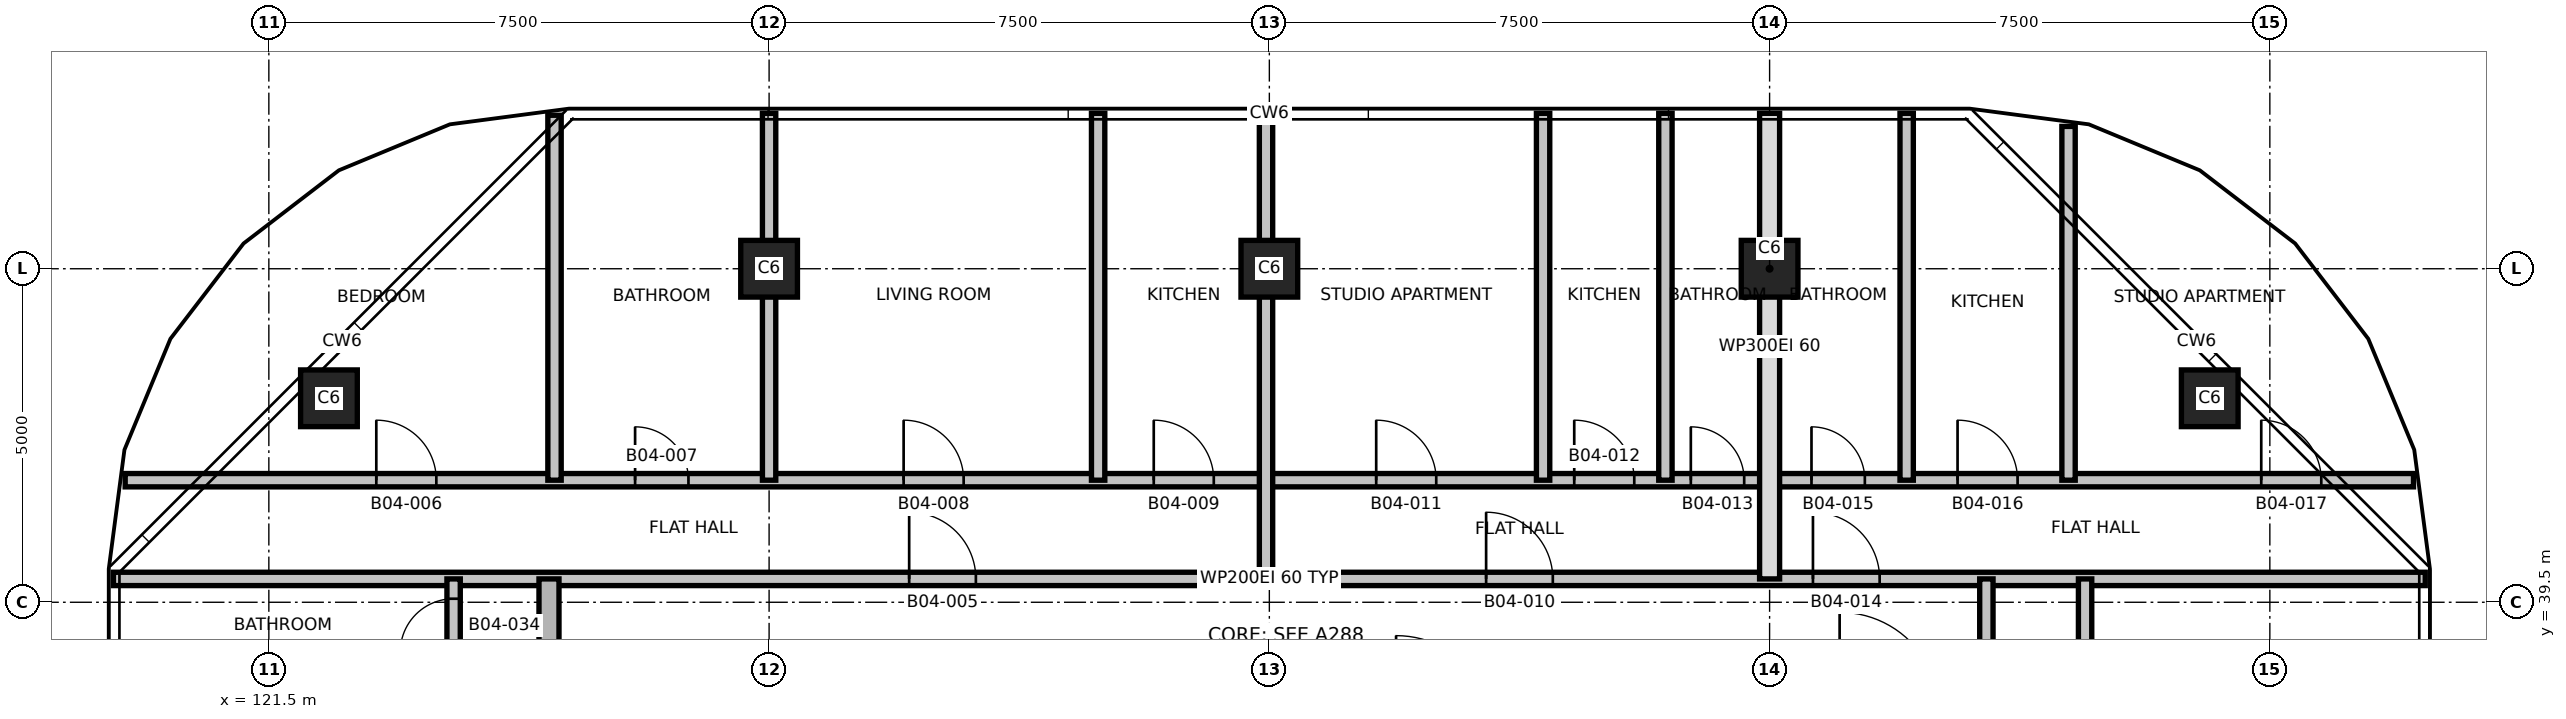
"""IFC4 building model, lengths in metres.
Left out: names, types, materials, properties, quantities, classifications, styles, units other than length and angle.
Written with IfcOpenShell. Run it as: python <this file> out.ifc"""

import sys

from ifc_helpers import new_model, si_unit, direction, frame, frame_2d, origin, origin_2d, place, context, subcontext, project, spatial, rectangle, extrude, element, fill, save


model = new_model("IFC4")
c1 = context("Model", 3, precision=1e-05, world=origin(), true_north=direction((0.0, 1.0)))
c2 = subcontext(c1, "Body", "Model", "MODEL_VIEW")
j1 = project(units=[si_unit("LENGTHUNIT", "METRE"), si_unit("PLANEANGLEUNIT", "RADIAN")], contexts=[c1])
p1 = place(None, origin())
s1 = spatial("IfcSite", under=j1, at=p1, CompositionType="ELEMENT")
p2 = place(p1, origin())
s2 = spatial("IfcBuilding", under=s1, at=p2, CompositionType="ELEMENT")
p3 = place(p2, frame((0.0, 0.0, 63.1)))
s3 = spatial("IfcBuildingStorey", under=s2, at=p3, CompositionType="ELEMENT", Elevation=63.1)
for number, where, z_axis, x_axis in (
    (1, (122.401, 42.558, 0.0), (0.0, 0.0, 1.0), (1.0, 0.0, 0.0)),
    (2, (150.599, 42.558, 0.0), (0.0, 0.0, 1.0), (1.0, 0.0, 0.0)),
    (3, (129.0, 44.5, 0.0), (0.0, 0.0, 1.0), (1.0, 0.0, 0.0)),
    (4, (136.5, 44.5, 0.0), (0.0, 0.0, 1.0), (1.0, 0.0, 0.0)),
    (5, (144.0, 44.5, 0.0), (0.0, 0.0, 1.0), (1.0, 0.0, 0.0)),
):
    element("IfcColumn", number, at=place(p3, frame(where, z_axis=z_axis, x_axis=x_axis)), inside=s3, PredefinedType="COLUMN", context=c2, shape_type="SweptSolid", body=[
        extrude(rectangle(XDim=0.85, YDim=0.85, at=origin_2d()), origin(), (0.0, 0.0, 1.0), 3.7),
    ])
p4 = place(p3, frame((119.17, 39.85, 0.0), z_axis=(0.0, 0.0, 1.0), x_axis=(1.0, 0.0, 0.0)))
e6 = element("IfcWall", 6, at=p4, inside=s3, PredefinedType="PARTITIONING", context=c2, shape_type="SweptSolid", body=[
    extrude(rectangle(XDim=34.66, YDim=0.2, at=frame_2d((17.33, 0.0))), origin(), (0.0, 0.0, 1.0), 3.4),
])
p5 = place(p4, frame((11.93, 0.0, 0.0)))
e7 = element("IfcOpeningElement", 7, at=p5, cuts=e6, PredefinedType="OPENING", context=c2, shape_type="SweptSolid", body=[
    extrude(rectangle(XDim=1.0, YDim=2.1, at=frame_2d((0.5, 1.05))), frame((0.0, 0.11, 0.0), z_axis=(0.0, -1.0, 0.0), x_axis=(1.0, 0.0, 0.0)), (0.0, 0.0, 1.0), 0.22),
])
p6 = place(p4, frame((20.58, 0.0, 0.0)))
e8 = element("IfcOpeningElement", 8, at=p6, cuts=e6, PredefinedType="OPENING", context=c2, shape_type="SweptSolid", body=[
    extrude(rectangle(XDim=1.0, YDim=2.1, at=frame_2d((0.5, 1.05))), frame((0.0, 0.11, 0.0), z_axis=(0.0, -1.0, 0.0), x_axis=(1.0, 0.0, 0.0)), (0.0, 0.0, 1.0), 0.22),
])
p7 = place(p4, frame((25.48, 0.0, 0.0)))
e9 = element("IfcOpeningElement", 9, at=p7, cuts=e6, PredefinedType="OPENING", context=c2, shape_type="SweptSolid", body=[
    extrude(rectangle(XDim=1.0, YDim=2.1, at=frame_2d((0.5, 1.05))), frame((0.0, 0.11, 0.0), z_axis=(0.0, -1.0, 0.0), x_axis=(1.0, 0.0, 0.0)), (0.0, 0.0, 1.0), 0.22),
])
p8 = place(p3, frame((119.346, 41.33, 0.0), z_axis=(0.0, 0.0, 1.0), x_axis=(1.0, 0.0, 0.0)))
e10 = element("IfcWall", 10, at=p8, inside=s3, PredefinedType="PARTITIONING", context=c2, shape_type="SweptSolid", body=[
    extrude(rectangle(XDim=34.308, YDim=0.2, at=frame_2d((17.154, 0.0))), origin(), (0.0, 0.0, 1.0), 3.4),
])
p9 = place(p8, frame((3.765, 0.0, 0.0)))
e11 = element("IfcOpeningElement", 11, at=p9, cuts=e10, PredefinedType="OPENING", context=c2, shape_type="SweptSolid", body=[
    extrude(rectangle(XDim=0.9, YDim=2.1, at=frame_2d((0.45, 1.05))), frame((0.0, 0.11, 0.0), z_axis=(0.0, -1.0, 0.0), x_axis=(1.0, 0.0, 0.0)), (0.0, 0.0, 1.0), 0.22),
])
p10 = place(p8, frame((7.645, 0.0, 0.0)))
e12 = element("IfcOpeningElement", 12, at=p10, cuts=e10, PredefinedType="OPENING", context=c2, shape_type="SweptSolid", body=[
    extrude(rectangle(XDim=0.8, YDim=2.1, at=frame_2d((0.4, 1.05))), frame((0.0, 0.11, 0.0), z_axis=(0.0, -1.0, 0.0), x_axis=(1.0, 0.0, 0.0)), (0.0, 0.0, 1.0), 0.22),
])
p11 = place(p8, frame((11.671, 0.0, 0.0)))
e13 = element("IfcOpeningElement", 13, at=p11, cuts=e10, PredefinedType="OPENING", context=c2, shape_type="SweptSolid", body=[
    extrude(rectangle(XDim=0.9, YDim=2.1, at=frame_2d((0.45, 1.05))), frame((0.0, 0.11, 0.0), z_axis=(0.0, -1.0, 0.0), x_axis=(1.0, 0.0, 0.0)), (0.0, 0.0, 1.0), 0.22),
])
p12 = place(p8, frame((15.421, 0.0, 0.0)))
e14 = element("IfcOpeningElement", 14, at=p12, cuts=e10, PredefinedType="OPENING", context=c2, shape_type="SweptSolid", body=[
    extrude(rectangle(XDim=0.9, YDim=2.1, at=frame_2d((0.45, 1.05))), frame((0.0, 0.11, 0.0), z_axis=(0.0, -1.0, 0.0), x_axis=(1.0, 0.0, 0.0)), (0.0, 0.0, 1.0), 0.22),
])
p13 = place(p8, frame((18.756, 0.0, 0.0)))
e15 = element("IfcOpeningElement", 15, at=p13, cuts=e10, PredefinedType="OPENING", context=c2, shape_type="SweptSolid", body=[
    extrude(rectangle(XDim=0.9, YDim=2.1, at=frame_2d((0.45, 1.05))), frame((0.0, 0.11, 0.0), z_axis=(0.0, -1.0, 0.0), x_axis=(1.0, 0.0, 0.0)), (0.0, 0.0, 1.0), 0.22),
])
p14 = place(p8, frame((21.725, 0.0, 0.0)))
e16 = element("IfcOpeningElement", 16, at=p14, cuts=e10, PredefinedType="OPENING", context=c2, shape_type="SweptSolid", body=[
    extrude(rectangle(XDim=0.9, YDim=2.1, at=frame_2d((0.45, 1.05))), frame((0.0, 0.11, 0.0), z_axis=(0.0, -1.0, 0.0), x_axis=(1.0, 0.0, 0.0)), (0.0, 0.0, 1.0), 0.22),
])
p15 = place(p8, frame((23.473, 0.0, 0.0)))
e17 = element("IfcOpeningElement", 17, at=p15, cuts=e10, PredefinedType="OPENING", context=c2, shape_type="SweptSolid", body=[
    extrude(rectangle(XDim=0.8, YDim=2.1, at=frame_2d((0.4, 1.05))), frame((0.0, 0.11, 0.0), z_axis=(0.0, -1.0, 0.0), x_axis=(1.0, 0.0, 0.0)), (0.0, 0.0, 1.0), 0.22),
])
p16 = place(p8, frame((25.282, 0.0, 0.0)))
e18 = element("IfcOpeningElement", 18, at=p16, cuts=e10, PredefinedType="OPENING", context=c2, shape_type="SweptSolid", body=[
    extrude(rectangle(XDim=0.8, YDim=2.1, at=frame_2d((0.4, 1.05))), frame((0.0, 0.11, 0.0), z_axis=(0.0, -1.0, 0.0), x_axis=(1.0, 0.0, 0.0)), (0.0, 0.0, 1.0), 0.22),
])
p17 = place(p8, frame((27.472, 0.0, 0.0)))
e19 = element("IfcOpeningElement", 19, at=p17, cuts=e10, PredefinedType="OPENING", context=c2, shape_type="SweptSolid", body=[
    extrude(rectangle(XDim=0.9, YDim=2.1, at=frame_2d((0.45, 1.05))), frame((0.0, 0.11, 0.0), z_axis=(0.0, -1.0, 0.0), x_axis=(1.0, 0.0, 0.0)), (0.0, 0.0, 1.0), 0.22),
])
p18 = place(p8, frame((32.025, 0.0, 0.0)))
e20 = element("IfcOpeningElement", 20, at=p18, cuts=e10, PredefinedType="OPENING", context=c2, shape_type="SweptSolid", body=[
    extrude(rectangle(XDim=0.9, YDim=2.1, at=frame_2d((0.45, 1.05))), frame((0.0, 0.11, 0.0), z_axis=(0.0, -1.0, 0.0), x_axis=(1.0, 0.0, 0.0)), (0.0, 0.0, 1.0), 0.22),
])
p19 = place(p3, frame((124.27, 22.15, 0.0), z_axis=(0.0, 0.0, 1.0), x_axis=(0.0, 1.0, 0.0)))
e21 = element("IfcWall", 21, at=p19, inside=s3, PredefinedType="PARTITIONING", context=c2, shape_type="SweptSolid", body=[
    extrude(rectangle(XDim=17.7, YDim=0.2, at=frame_2d((8.85, 0.0))), origin(), (0.0, 0.0, 1.0), 3.4),
])
p20 = place(p19, frame((1.725, 0.0, 0.0)))
e22 = element("IfcOpeningElement", 22, at=p20, cuts=e21, PredefinedType="OPENING", context=c2, shape_type="SweptSolid", body=[
    extrude(rectangle(XDim=0.9, YDim=2.1, at=frame_2d((0.45, 1.05))), frame((0.0, 0.11, 0.0), z_axis=(0.0, -1.0, 0.0), x_axis=(1.0, 0.0, 0.0)), (0.0, 0.0, 1.0), 0.22),
])
p21 = place(p19, frame((6.867, 0.0, 0.0)))
e23 = element("IfcOpeningElement", 23, at=p21, cuts=e21, PredefinedType="OPENING", context=c2, shape_type="SweptSolid", body=[
    extrude(rectangle(XDim=0.9, YDim=2.1, at=frame_2d((0.45, 1.05))), frame((0.0, 0.11, 0.0), z_axis=(0.0, -1.0, 0.0), x_axis=(1.0, 0.0, 0.0)), (0.0, 0.0, 1.0), 0.22),
])
p22 = place(p19, frame((11.367, 0.0, 0.0)))
e24 = element("IfcOpeningElement", 24, at=p22, cuts=e21, PredefinedType="OPENING", context=c2, shape_type="SweptSolid", body=[
    extrude(rectangle(XDim=0.9, YDim=2.1, at=frame_2d((0.45, 1.05))), frame((0.0, 0.11, 0.0), z_axis=(0.0, -1.0, 0.0), x_axis=(1.0, 0.0, 0.0)), (0.0, 0.0, 1.0), 0.22),
])
p23 = place(p19, frame((14.378, 0.0, 0.0)))
e25 = element("IfcOpeningElement", 25, at=p23, cuts=e21, PredefinedType="OPENING", context=c2, shape_type="SweptSolid", body=[
    extrude(rectangle(XDim=0.9, YDim=2.1, at=frame_2d((0.45, 1.05))), frame((0.0, 0.11, 0.0), z_axis=(0.0, -1.0, 0.0), x_axis=(1.0, 0.0, 0.0)), (0.0, 0.0, 1.0), 0.22),
])
p24 = place(p19, frame((16.603, 0.0, 0.0)))
e26 = element("IfcOpeningElement", 26, at=p24, cuts=e21, PredefinedType="OPENING", context=c2, shape_type="SweptSolid", body=[
    extrude(rectangle(XDim=0.8, YDim=2.1, at=frame_2d((0.4, 1.05))), frame((0.0, 0.11, 0.0), z_axis=(0.0, -1.0, 0.0), x_axis=(1.0, 0.0, 0.0)), (0.0, 0.0, 1.0), 0.22),
])
p25 = place(p3, frame((125.7, 22.15, 0.0), z_axis=(0.0, 0.0, 1.0), x_axis=(0.0, 1.0, 0.0)))
e27 = element("IfcWall", 27, at=p25, inside=s3, PredefinedType="SHEAR", context=c2, shape_type="SweptSolid", body=[
    extrude(rectangle(XDim=17.7, YDim=0.3, at=frame_2d((8.85, 0.0))), origin(), (0.0, 0.0, 1.0), 3.4),
])
p26 = place(p25, frame((2.7, 0.0, 0.0)))
e28 = element("IfcOpeningElement", 28, at=p26, cuts=e27, PredefinedType="OPENING", context=c2, shape_type="SweptSolid", body=[
    extrude(rectangle(XDim=1.0, YDim=2.1, at=frame_2d((0.5, 1.05))), frame((0.0, 0.16, 0.0), z_axis=(0.0, -1.0, 0.0), x_axis=(1.0, 0.0, 0.0)), (0.0, 0.0, 1.0), 0.32),
])
p27 = place(p3, frame((125.783, 41.33, 0.0), z_axis=(0.0, 0.0, 1.0), x_axis=(0.0, 1.0, 0.0)))
e29 = element("IfcWall", 29, at=p27, inside=s3, PredefinedType="PARTITIONING", context=c2, shape_type="SweptSolid", body=[
    extrude(rectangle(XDim=5.471, YDim=0.2, at=frame_2d((2.735, 0.0))), origin(), (0.0, 0.0, 1.0), 3.4),
])
for number, where, z_axis, x_axis in (
    (30, (129.0, 41.33, 0.0), (0.0, 0.0, 1.0), (0.0, 1.0, 0.0)),
    (31, (133.933, 41.33, 0.0), (0.0, 0.0, 1.0), (0.0, 1.0, 0.0)),
):
    element("IfcWall", number, at=place(p3, frame(where, z_axis=z_axis, x_axis=x_axis)), inside=s3, PredefinedType="PARTITIONING", context=c2, shape_type="SweptSolid", body=[
        extrude(rectangle(XDim=5.5, YDim=0.2, at=frame_2d((2.75, 0.0))), origin(), (0.0, 0.0, 1.0), 3.4),
    ])
p28 = place(p3, frame((136.45, 39.85, 0.0), z_axis=(0.0, 0.0, 1.0), x_axis=(0.0, 1.0, 0.0)))
e32 = element("IfcWall", 32, at=p28, inside=s3, PredefinedType="PARTITIONING", context=c2, shape_type="SweptSolid", body=[
    extrude(rectangle(XDim=6.98, YDim=0.2, at=frame_2d((3.49, 0.0))), origin(), (0.0, 0.0, 1.0), 3.4),
])
for number, where, z_axis, x_axis in (
    (33, (140.604, 41.33, 0.0), (0.0, 0.0, 1.0), (0.0, 1.0, 0.0)),
    (34, (142.438, 41.33, 0.0), (0.0, 0.0, 1.0), (0.0, 1.0, 0.0)),
):
    element("IfcWall", number, at=place(p3, frame(where, z_axis=z_axis, x_axis=x_axis)), inside=s3, PredefinedType="PARTITIONING", context=c2, shape_type="SweptSolid", body=[
        extrude(rectangle(XDim=5.5, YDim=0.2, at=frame_2d((2.75, 0.0))), origin(), (0.0, 0.0, 1.0), 3.4),
    ])
p29 = place(p3, frame((144.0, 39.85, 0.0), z_axis=(0.0, 0.0, 1.0), x_axis=(0.0, 1.0, 0.0)))
e35 = element("IfcWall", 35, at=p29, inside=s3, PredefinedType="PARTITIONING", context=c2, shape_type="SweptSolid", body=[
    extrude(rectangle(XDim=6.98, YDim=0.3, at=frame_2d((3.49, 0.0))), origin(), (0.0, 0.0, 1.0), 3.4),
])
p30 = place(p3, frame((146.055, 41.33, 0.0), z_axis=(0.0, 0.0, 1.0), x_axis=(0.0, 1.0, 0.0)))
e36 = element("IfcWall", 36, at=p30, inside=s3, PredefinedType="PARTITIONING", context=c2, shape_type="SweptSolid", body=[
    extrude(rectangle(XDim=5.5, YDim=0.2, at=frame_2d((2.75, 0.0))), origin(), (0.0, 0.0, 1.0), 3.4),
])
p31 = place(p3, frame((147.25, 22.15, 0.0), z_axis=(0.0, 0.0, 1.0), x_axis=(0.0, 1.0, 0.0)))
e37 = element("IfcWall", 37, at=p31, inside=s3, PredefinedType="PARTITIONING", context=c2, shape_type="SweptSolid", body=[
    extrude(rectangle(XDim=17.7, YDim=0.2, at=frame_2d((8.85, 0.0))), origin(), (0.0, 0.0, 1.0), 3.4),
])
p32 = place(p31, frame((2.65, 0.0, 0.0)))
e38 = element("IfcOpeningElement", 38, at=p32, cuts=e37, PredefinedType="OPENING", context=c2, shape_type="SweptSolid", body=[
    extrude(rectangle(XDim=1.0, YDim=2.1, at=frame_2d((0.5, 1.05))), frame((0.0, 0.11, 0.0), z_axis=(0.0, -1.0, 0.0), x_axis=(1.0, 0.0, 0.0)), (0.0, 0.0, 1.0), 0.22),
])
p33 = place(p3, frame((148.482, 41.33, 0.0), z_axis=(0.0, 0.0, 1.0), x_axis=(0.0, 1.0, 0.0)))
e39 = element("IfcWall", 39, at=p33, inside=s3, PredefinedType="PARTITIONING", context=c2, shape_type="SweptSolid", body=[
    extrude(rectangle(XDim=5.304, YDim=0.2, at=frame_2d((2.652, 0.0))), origin(), (0.0, 0.0, 1.0), 3.4),
])
p34 = place(p3, frame((148.73, 22.15, 0.0), z_axis=(0.0, 0.0, 1.0), x_axis=(0.0, 1.0, 0.0)))
e40 = element("IfcWall", 40, at=p34, inside=s3, PredefinedType="PARTITIONING", context=c2, shape_type="SweptSolid", body=[
    extrude(rectangle(XDim=17.7, YDim=0.2, at=frame_2d((8.85, 0.0))), origin(), (0.0, 0.0, 1.0), 3.4),
])
p35 = place(p34, frame((1.028, 0.0, 0.0)))
e41 = element("IfcOpeningElement", 41, at=p35, cuts=e40, PredefinedType="OPENING", context=c2, shape_type="SweptSolid", body=[
    extrude(rectangle(XDim=0.9, YDim=2.1, at=frame_2d((0.45, 1.05))), frame((0.0, 0.11, 0.0), z_axis=(0.0, -1.0, 0.0), x_axis=(1.0, 0.0, 0.0)), (0.0, 0.0, 1.0), 0.22),
])
p36 = place(p34, frame((3.253, 0.0, 0.0)))
e42 = element("IfcOpeningElement", 42, at=p36, cuts=e40, PredefinedType="OPENING", context=c2, shape_type="SweptSolid", body=[
    extrude(rectangle(XDim=0.8, YDim=2.1, at=frame_2d((0.4, 1.05))), frame((0.0, 0.11, 0.0), z_axis=(0.0, -1.0, 0.0), x_axis=(1.0, 0.0, 0.0)), (0.0, 0.0, 1.0), 0.22),
])
p37 = place(p34, frame((6.195, 0.0, 0.0)))
e43 = element("IfcOpeningElement", 43, at=p37, cuts=e40, PredefinedType="OPENING", context=c2, shape_type="SweptSolid", body=[
    extrude(rectangle(XDim=0.9, YDim=2.1, at=frame_2d((0.45, 1.05))), frame((0.0, 0.11, 0.0), z_axis=(0.0, -1.0, 0.0), x_axis=(1.0, 0.0, 0.0)), (0.0, 0.0, 1.0), 0.22),
])
p38 = place(p34, frame((9.641, 0.0, 0.0)))
e44 = element("IfcOpeningElement", 44, at=p38, cuts=e40, PredefinedType="OPENING", context=c2, shape_type="SweptSolid", body=[
    extrude(rectangle(XDim=0.9, YDim=2.1, at=frame_2d((0.45, 1.05))), frame((0.0, 0.11, 0.0), z_axis=(0.0, -1.0, 0.0), x_axis=(1.0, 0.0, 0.0)), (0.0, 0.0, 1.0), 0.22),
])
p39 = place(p34, frame((11.895, 0.0, 0.0)))
e45 = element("IfcOpeningElement", 45, at=p39, cuts=e40, PredefinedType="OPENING", context=c2, shape_type="SweptSolid", body=[
    extrude(rectangle(XDim=0.8, YDim=2.1, at=frame_2d((0.4, 1.05))), frame((0.0, 0.11, 0.0), z_axis=(0.0, -1.0, 0.0), x_axis=(1.0, 0.0, 0.0)), (0.0, 0.0, 1.0), 0.22),
])
p40 = place(p34, frame((15.075, 0.0, 0.0)))
e46 = element("IfcOpeningElement", 46, at=p40, cuts=e40, PredefinedType="OPENING", context=c2, shape_type="SweptSolid", body=[
    extrude(rectangle(XDim=0.9, YDim=2.1, at=frame_2d((0.45, 1.05))), frame((0.0, 0.11, 0.0), z_axis=(0.0, -1.0, 0.0), x_axis=(1.0, 0.0, 0.0)), (0.0, 0.0, 1.0), 0.22),
])
p41 = place(p5, origin())
e47 = element("IfcDoor", 47, at=p41, inside=s3, OperationType="SINGLE_SWING_LEFT", PredefinedType="DOOR", context=c2, shape_type="SweptSolid", body=[
    extrude(rectangle(XDim=1.0, YDim=2.1, at=frame_2d((0.5, 1.05))), frame((0.0, 0.025, 0.0), z_axis=(0.0, -1.0, 0.0), x_axis=(1.0, 0.0, 0.0)), (0.0, 0.0, 1.0), 0.05),
])
fill(e7, e47)
p42 = place(p9, origin())
e48 = element("IfcDoor", 48, at=p42, inside=s3, OperationType="SINGLE_SWING_RIGHT", PredefinedType="DOOR", context=c2, shape_type="SweptSolid", body=[
    extrude(rectangle(XDim=0.9, YDim=2.1, at=frame_2d((0.45, 1.05))), frame((0.0, 0.025, 0.0), z_axis=(0.0, -1.0, 0.0), x_axis=(1.0, 0.0, 0.0)), (0.0, 0.0, 1.0), 0.05),
])
fill(e11, e48)
p43 = place(p10, origin())
e49 = element("IfcDoor", 49, at=p43, inside=s3, OperationType="SINGLE_SWING_LEFT", PredefinedType="DOOR", context=c2, shape_type="SweptSolid", body=[
    extrude(rectangle(XDim=0.8, YDim=2.1, at=frame_2d((0.4, 1.05))), frame((0.0, 0.025, 0.0), z_axis=(0.0, -1.0, 0.0), x_axis=(1.0, 0.0, 0.0)), (0.0, 0.0, 1.0), 0.05),
])
fill(e12, e49)
p44 = place(p11, origin())
e50 = element("IfcDoor", 50, at=p44, inside=s3, OperationType="SINGLE_SWING_RIGHT", PredefinedType="DOOR", context=c2, shape_type="SweptSolid", body=[
    extrude(rectangle(XDim=0.9, YDim=2.1, at=frame_2d((0.45, 1.05))), frame((0.0, 0.025, 0.0), z_axis=(0.0, -1.0, 0.0), x_axis=(1.0, 0.0, 0.0)), (0.0, 0.0, 1.0), 0.05),
])
fill(e13, e50)
p45 = place(p12, origin())
e51 = element("IfcDoor", 51, at=p45, inside=s3, OperationType="SINGLE_SWING_LEFT", PredefinedType="DOOR", context=c2, shape_type="SweptSolid", body=[
    extrude(rectangle(XDim=0.9, YDim=2.1, at=frame_2d((0.45, 1.05))), frame((0.0, 0.025, 0.0), z_axis=(0.0, -1.0, 0.0), x_axis=(1.0, 0.0, 0.0)), (0.0, 0.0, 1.0), 0.05),
])
fill(e14, e51)
p46 = place(p6, origin())
e52 = element("IfcDoor", 52, at=p46, inside=s3, OperationType="SINGLE_SWING_RIGHT", PredefinedType="DOOR", context=c2, shape_type="SweptSolid", body=[
    extrude(rectangle(XDim=1.0, YDim=2.1, at=frame_2d((0.5, 1.05))), frame((0.0, 0.025, 0.0), z_axis=(0.0, -1.0, 0.0), x_axis=(1.0, 0.0, 0.0)), (0.0, 0.0, 1.0), 0.05),
])
fill(e8, e52)
p47 = place(p13, origin())
e53 = element("IfcDoor", 53, at=p47, inside=s3, OperationType="SINGLE_SWING_LEFT", PredefinedType="DOOR", context=c2, shape_type="SweptSolid", body=[
    extrude(rectangle(XDim=0.9, YDim=2.1, at=frame_2d((0.45, 1.05))), frame((0.0, 0.025, 0.0), z_axis=(0.0, -1.0, 0.0), x_axis=(1.0, 0.0, 0.0)), (0.0, 0.0, 1.0), 0.05),
])
fill(e15, e53)
p48 = place(p14, origin())
e54 = element("IfcDoor", 54, at=p48, inside=s3, OperationType="SINGLE_SWING_RIGHT", PredefinedType="DOOR", context=c2, shape_type="SweptSolid", body=[
    extrude(rectangle(XDim=0.9, YDim=2.1, at=frame_2d((0.45, 1.05))), frame((0.0, 0.025, 0.0), z_axis=(0.0, -1.0, 0.0), x_axis=(1.0, 0.0, 0.0)), (0.0, 0.0, 1.0), 0.05),
])
fill(e16, e54)
p49 = place(p15, origin())
e55 = element("IfcDoor", 55, at=p49, inside=s3, OperationType="SINGLE_SWING_LEFT", PredefinedType="DOOR", context=c2, shape_type="SweptSolid", body=[
    extrude(rectangle(XDim=0.8, YDim=2.1, at=frame_2d((0.4, 1.05))), frame((0.0, 0.025, 0.0), z_axis=(0.0, -1.0, 0.0), x_axis=(1.0, 0.0, 0.0)), (0.0, 0.0, 1.0), 0.05),
])
fill(e17, e55)
p50 = place(p7, origin())
e56 = element("IfcDoor", 56, at=p50, inside=s3, OperationType="SINGLE_SWING_RIGHT", PredefinedType="DOOR", context=c2, shape_type="SweptSolid", body=[
    extrude(rectangle(XDim=1.0, YDim=2.1, at=frame_2d((0.5, 1.05))), frame((0.0, 0.025, 0.0), z_axis=(0.0, -1.0, 0.0), x_axis=(1.0, 0.0, 0.0)), (0.0, 0.0, 1.0), 0.05),
])
fill(e9, e56)
p51 = place(p16, origin())
e57 = element("IfcDoor", 57, at=p51, inside=s3, OperationType="SINGLE_SWING_LEFT", PredefinedType="DOOR", context=c2, shape_type="SweptSolid", body=[
    extrude(rectangle(XDim=0.8, YDim=2.1, at=frame_2d((0.4, 1.05))), frame((0.0, 0.025, 0.0), z_axis=(0.0, -1.0, 0.0), x_axis=(1.0, 0.0, 0.0)), (0.0, 0.0, 1.0), 0.05),
])
fill(e18, e57)
p52 = place(p17, origin())
e58 = element("IfcDoor", 58, at=p52, inside=s3, OperationType="SINGLE_SWING_RIGHT", PredefinedType="DOOR", context=c2, shape_type="SweptSolid", body=[
    extrude(rectangle(XDim=0.9, YDim=2.1, at=frame_2d((0.45, 1.05))), frame((0.0, 0.025, 0.0), z_axis=(0.0, -1.0, 0.0), x_axis=(1.0, 0.0, 0.0)), (0.0, 0.0, 1.0), 0.05),
])
fill(e19, e58)
p53 = place(p18, origin())
e59 = element("IfcDoor", 59, at=p53, inside=s3, OperationType="SINGLE_SWING_LEFT", PredefinedType="DOOR", context=c2, shape_type="SweptSolid", body=[
    extrude(rectangle(XDim=0.9, YDim=2.1, at=frame_2d((0.45, 1.05))), frame((0.0, 0.025, 0.0), z_axis=(0.0, -1.0, 0.0), x_axis=(1.0, 0.0, 0.0)), (0.0, 0.0, 1.0), 0.05),
])
fill(e20, e59)
p54 = place(p24, origin())
e60 = element("IfcDoor", 60, at=p54, inside=s3, OperationType="SINGLE_SWING_RIGHT", PredefinedType="DOOR", context=c2, shape_type="SweptSolid", body=[
    extrude(rectangle(XDim=0.8, YDim=2.1, at=frame_2d((0.4, 1.05))), frame((0.0, 0.025, 0.0), z_axis=(0.0, -1.0, 0.0), x_axis=(1.0, 0.0, 0.0)), (0.0, 0.0, 1.0), 0.05),
])
fill(e26, e60)
save(model, sys.argv[1])
